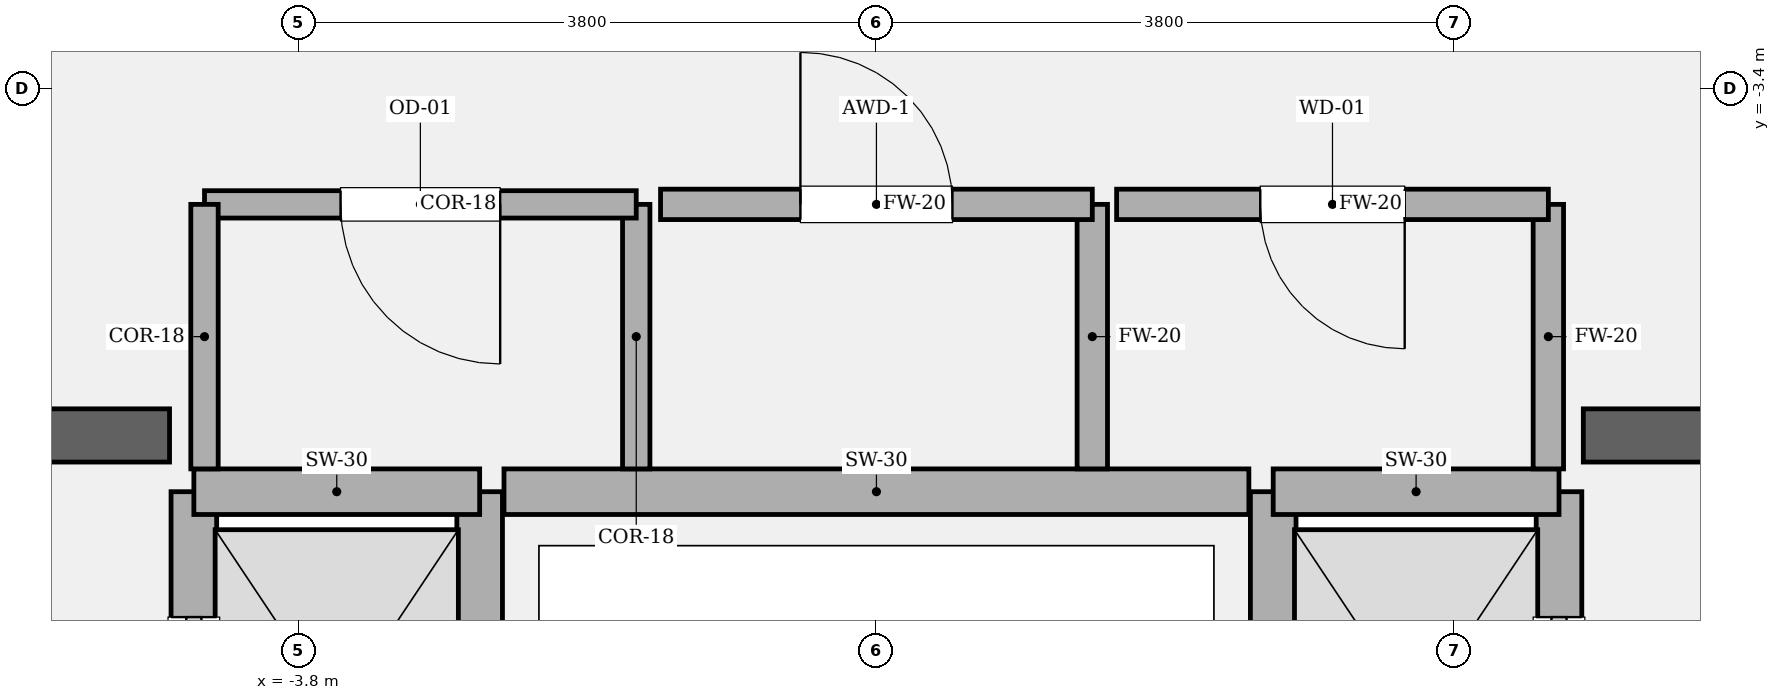
"""IFC4 building model, lengths in metres.
Left out: names, types, materials, properties, quantities, classifications, styles, units other than length and angle.
Written with IfcOpenShell. Run it as: python <this file> out.ifc"""

import sys

from ifc_helpers import new_model, si_unit, direction, frame, frame_2d, origin, place, context, subcontext, project, spatial, rectangle, extrude, element, fill, save


model = new_model("IFC4")
c1 = context("Model", 3, precision=1e-05, world=origin(), true_north=direction((0.0, 1.0)))
c2 = subcontext(c1, "Body", "Model", "MODEL_VIEW")
j1 = project(units=[si_unit("LENGTHUNIT", "METRE"), si_unit("PLANEANGLEUNIT", "RADIAN")], contexts=[c1])
p1 = place(None, origin())
s1 = spatial("IfcSite", under=j1, at=p1, CompositionType="ELEMENT")
p2 = place(p1, origin())
s2 = spatial("IfcBuilding", under=s1, at=p2, CompositionType="ELEMENT")
p3 = place(p2, frame((0.0, 0.0, 11.4)))
s3 = spatial("IfcBuildingStorey", under=s2, at=p3, CompositionType="ELEMENT", Elevation=11.4)
p4 = place(p3, frame((-9.825, -5.68, 0.0), z_axis=(0.0, 0.0, 1.0), x_axis=(1.0, 0.0, 0.0)))
e1 = element("IfcWall", 1, at=p4, inside=s3, PredefinedType="SOLIDWALL", context=c2, shape_type="SweptSolid", body=[
    extrude(rectangle(XDim=5.175, YDim=0.35, at=frame_2d((2.587, 0.0))), origin(), (0.0, 0.0, 1.0), 5.4),
])
p5 = place(p4, frame((1.285, 0.0, 0.0)))
e2 = element("IfcOpeningElement", 2, at=p5, cuts=e1, PredefinedType="OPENING", context=c2, shape_type="SweptSolid", body=[
    extrude(rectangle(XDim=1.18, YDim=2.2, at=frame_2d((0.59, 1.1))), frame((0.0, 0.185, 0.0), z_axis=(0.0, -1.0, 0.0), x_axis=(1.0, 0.0, 0.0)), (0.0, 0.0, 1.0), 0.37),
])
p6 = place(p3, frame((4.65, -5.68, 0.0), z_axis=(0.0, 0.0, 1.0), x_axis=(1.0, 0.0, 0.0)))
e3 = element("IfcWall", 3, at=p6, inside=s3, PredefinedType="SOLIDWALL", context=c2, shape_type="SweptSolid", body=[
    extrude(rectangle(XDim=5.175, YDim=0.35, at=frame_2d((2.587, 0.0))), origin(), (0.0, 0.0, 1.0), 5.4),
])
p7 = place(p6, frame((2.71, 0.0, 0.0)))
e4 = element("IfcOpeningElement", 4, at=p7, cuts=e3, PredefinedType="OPENING", context=c2, shape_type="SweptSolid", body=[
    extrude(rectangle(XDim=1.18, YDim=2.2, at=frame_2d((0.59, 1.1))), frame((0.0, 0.185, 0.0), z_axis=(0.0, -1.0, 0.0), x_axis=(1.0, 0.0, 0.0)), (0.0, 0.0, 1.0), 0.37),
])
p8 = place(p3, frame((-4.49, -8.82, 0.0), z_axis=(0.0, 0.0, 1.0), x_axis=(0.0, 1.0, 0.0)))
e5 = element("IfcWall", 5, at=p8, inside=s3, PredefinedType="SOLIDWALL", context=c2, shape_type="SweptSolid", body=[
    extrude(rectangle(XDim=2.77, YDim=0.3, at=frame_2d((1.385, 0.0))), origin(), (0.0, 0.0, 1.0), 5.12),
])
p9 = place(p8, frame((0.825, 0.0, 0.0)))
e6 = element("IfcOpeningElement", 6, at=p9, cuts=e5, PredefinedType="OPENING", context=c2, shape_type="SweptSolid", body=[
    extrude(rectangle(XDim=1.12, YDim=2.25, at=frame_2d((0.56, 1.125))), frame((0.0, 0.16, 0.0), z_axis=(0.0, -1.0, 0.0), x_axis=(1.0, 0.0, 0.0)), (0.0, 0.0, 1.0), 0.32),
])
p10 = place(p3, frame((-2.61, -8.82, 0.0), z_axis=(0.0, 0.0, 1.0), x_axis=(0.0, 1.0, 0.0)))
e7 = element("IfcWall", 7, at=p10, inside=s3, PredefinedType="SOLIDWALL", context=c2, shape_type="SweptSolid", body=[
    extrude(rectangle(XDim=2.77, YDim=0.3, at=frame_2d((1.385, 0.0))), origin(), (0.0, 0.0, 1.0), 5.12),
])
p11 = place(p3, frame((-4.49, -6.05, 0.0), z_axis=(0.0, 0.0, 1.0), x_axis=(1.0, 0.0, 0.0)))
e8 = element("IfcWall", 8, at=p11, inside=s3, PredefinedType="SOLIDWALL", context=c2, shape_type="SweptSolid", body=[
    extrude(rectangle(XDim=1.88, YDim=0.3, at=frame_2d((0.94, 0.0))), origin(), (0.0, 0.0, 1.0), 5.12),
])
p12 = place(p3, frame((4.49, -8.82, 0.0), z_axis=(0.0, 0.0, 1.0), x_axis=(0.0, 1.0, 0.0)))
e9 = element("IfcWall", 9, at=p12, inside=s3, PredefinedType="SOLIDWALL", context=c2, shape_type="SweptSolid", body=[
    extrude(rectangle(XDim=2.77, YDim=0.3, at=frame_2d((1.385, 0.0))), origin(), (0.0, 0.0, 1.0), 5.12),
])
p13 = place(p12, frame((0.825, 0.0, 0.0)))
e10 = element("IfcOpeningElement", 10, at=p13, cuts=e9, PredefinedType="OPENING", context=c2, shape_type="SweptSolid", body=[
    extrude(rectangle(XDim=1.12, YDim=2.25, at=frame_2d((0.56, 1.125))), frame((0.0, 0.16, 0.0), z_axis=(0.0, -1.0, 0.0), x_axis=(1.0, 0.0, 0.0)), (0.0, 0.0, 1.0), 0.32),
])
p14 = place(p3, frame((2.61, -8.82, 0.0), z_axis=(0.0, 0.0, 1.0), x_axis=(0.0, 1.0, 0.0)))
e11 = element("IfcWall", 11, at=p14, inside=s3, PredefinedType="SOLIDWALL", context=c2, shape_type="SweptSolid", body=[
    extrude(rectangle(XDim=2.77, YDim=0.3, at=frame_2d((1.385, 0.0))), origin(), (0.0, 0.0, 1.0), 5.12),
])
p15 = place(p3, frame((2.61, -6.05, 0.0), z_axis=(0.0, 0.0, 1.0), x_axis=(1.0, 0.0, 0.0)))
e12 = element("IfcWall", 12, at=p15, inside=s3, PredefinedType="SOLIDWALL", context=c2, shape_type="SweptSolid", body=[
    extrude(rectangle(XDim=1.88, YDim=0.3, at=frame_2d((0.94, 0.0))), origin(), (0.0, 0.0, 1.0), 5.12),
])
p16 = place(p3, frame((-2.45, -6.05, 0.0), z_axis=(0.0, 0.0, 1.0), x_axis=(1.0, 0.0, 0.0)))
e13 = element("IfcWall", 13, at=p16, inside=s3, PredefinedType="SOLIDWALL", context=c2, shape_type="SweptSolid", body=[
    extrude(rectangle(XDim=4.9, YDim=0.3, at=frame_2d((2.45, 0.0))), origin(), (0.0, 0.0, 1.0), 5.12),
])
p17 = place(p3, frame((-1.58, -5.9, 0.0), z_axis=(0.0, 0.0, 1.0), x_axis=(0.0, 1.0, 0.0)))
e14 = element("IfcWall", 14, at=p17, inside=s3, PredefinedType="PARTITIONING", context=c2, shape_type="SweptSolid", body=[
    extrude(rectangle(XDim=1.74, YDim=0.18, at=frame_2d((0.87, 0.0))), origin(), (0.0, 0.0, 1.0), 5.12),
])
p18 = place(p3, frame((-1.58, -4.16, 0.0), z_axis=(0.0, 0.0, 1.0), x_axis=(-1.0, 0.0, 0.0)))
e15 = element("IfcWall", 15, at=p18, inside=s3, PredefinedType="PARTITIONING", context=c2, shape_type="SweptSolid", body=[
    extrude(rectangle(XDim=2.84, YDim=0.18, at=frame_2d((1.42, 0.0))), origin(), (0.0, 0.0, 1.0), 5.12),
])
p19 = place(p18, frame((0.895, 0.0, 0.0)))
e16 = element("IfcOpeningElement", 16, at=p19, cuts=e15, PredefinedType="OPENING", context=c2, shape_type="SweptSolid", body=[
    extrude(rectangle(XDim=1.05, YDim=2.2, at=frame_2d((0.525, 1.1))), frame((0.0, 0.1, 0.0), z_axis=(0.0, -1.0, 0.0), x_axis=(1.0, 0.0, 0.0)), (0.0, 0.0, 1.0), 0.2),
])
p20 = place(p3, frame((-4.42, -4.16, 0.0), z_axis=(0.0, 0.0, 1.0), x_axis=(0.0, -1.0, 0.0)))
e17 = element("IfcWall", 17, at=p20, inside=s3, PredefinedType="PARTITIONING", context=c2, shape_type="SweptSolid", body=[
    extrude(rectangle(XDim=1.74, YDim=0.18, at=frame_2d((0.87, 0.0))), origin(), (0.0, 0.0, 1.0), 5.12),
])
p21 = place(p3, frame((1.42, -5.9, 0.0), z_axis=(0.0, 0.0, 1.0), x_axis=(0.0, 1.0, 0.0)))
e18 = element("IfcWall", 18, at=p21, inside=s3, PredefinedType="SOLIDWALL", context=c2, shape_type="SweptSolid", body=[
    extrude(rectangle(XDim=1.74, YDim=0.2, at=frame_2d((0.87, 0.0))), origin(), (0.0, 0.0, 1.0), 5.12),
])
p22 = place(p3, frame((1.42, -4.16, 0.0), z_axis=(0.0, 0.0, 1.0), x_axis=(-1.0, 0.0, 0.0)))
e19 = element("IfcWall", 19, at=p22, inside=s3, PredefinedType="SOLIDWALL", context=c2, shape_type="SweptSolid", body=[
    extrude(rectangle(XDim=2.84, YDim=0.2, at=frame_2d((1.42, 0.0))), origin(), (0.0, 0.0, 1.0), 5.12),
])
p23 = place(p22, frame((0.92, 0.0, 0.0)))
e20 = element("IfcOpeningElement", 20, at=p23, cuts=e19, PredefinedType="OPENING", context=c2, shape_type="SweptSolid", body=[
    extrude(rectangle(XDim=1.0, YDim=2.15, at=frame_2d((0.5, 1.075))), frame((0.0, 0.11, 0.0), z_axis=(0.0, -1.0, 0.0), x_axis=(1.0, 0.0, 0.0)), (0.0, 0.0, 1.0), 0.22),
])
p24 = place(p3, frame((4.42, -5.9, 0.0), z_axis=(0.0, 0.0, 1.0), x_axis=(0.0, 1.0, 0.0)))
e21 = element("IfcWall", 21, at=p24, inside=s3, PredefinedType="SOLIDWALL", context=c2, shape_type="SweptSolid", body=[
    extrude(rectangle(XDim=1.74, YDim=0.2, at=frame_2d((0.87, 0.0))), origin(), (0.0, 0.0, 1.0), 5.12),
])
p25 = place(p3, frame((4.42, -4.16, 0.0), z_axis=(0.0, 0.0, 1.0), x_axis=(-1.0, 0.0, 0.0)))
e22 = element("IfcWall", 22, at=p25, inside=s3, PredefinedType="SOLIDWALL", context=c2, shape_type="SweptSolid", body=[
    extrude(rectangle(XDim=2.84, YDim=0.2, at=frame_2d((1.42, 0.0))), origin(), (0.0, 0.0, 1.0), 5.12),
])
p26 = place(p25, frame((0.945, 0.0, 0.0)))
e23 = element("IfcOpeningElement", 23, at=p26, cuts=e22, PredefinedType="OPENING", context=c2, shape_type="SweptSolid", body=[
    extrude(rectangle(XDim=0.95, YDim=2.15, at=frame_2d((0.475, 1.075))), frame((0.0, 0.11, 0.0), z_axis=(0.0, -1.0, 0.0), x_axis=(1.0, 0.0, 0.0)), (0.0, 0.0, 1.0), 0.22),
])
p27 = place(p9, origin())
e24 = element("IfcDoor", 24, at=p27, inside=s3, OperationType="SLIDING_TO_LEFT", PredefinedType="DOOR", context=c2, shape_type="SweptSolid", body=[
    extrude(rectangle(XDim=1.12, YDim=2.25, at=frame_2d((0.56, 1.125))), frame((0.0, 0.025, 0.0), z_axis=(0.0, -1.0, 0.0), x_axis=(1.0, 0.0, 0.0)), (0.0, 0.0, 1.0), 0.05),
])
fill(e6, e24)
p28 = place(p13, origin())
e25 = element("IfcDoor", 25, at=p28, inside=s3, OperationType="SLIDING_TO_RIGHT", PredefinedType="DOOR", context=c2, shape_type="SweptSolid", body=[
    extrude(rectangle(XDim=1.12, YDim=2.25, at=frame_2d((0.56, 1.125))), frame((0.0, 0.025, 0.0), z_axis=(0.0, -1.0, 0.0), x_axis=(1.0, 0.0, 0.0)), (0.0, 0.0, 1.0), 0.05),
])
fill(e10, e25)
p29 = place(p19, origin())
e26 = element("IfcDoor", 26, at=p29, inside=s3, OperationType="SINGLE_SWING_LEFT", PredefinedType="DOOR", context=c2, shape_type="SweptSolid", body=[
    extrude(rectangle(XDim=1.05, YDim=2.2, at=frame_2d((0.525, 1.1))), frame((0.0, 0.025, 0.0), z_axis=(0.0, -1.0, 0.0), x_axis=(1.0, 0.0, 0.0)), (0.0, 0.0, 1.0), 0.05),
])
fill(e16, e26)
p30 = place(p23, origin())
e27 = element("IfcDoor", 27, at=p30, inside=s3, OperationType="SINGLE_SWING_RIGHT", PredefinedType="DOOR", context=c2, shape_type="SweptSolid", body=[
    extrude(rectangle(XDim=1.0, YDim=2.15, at=frame_2d((0.5, 1.075))), frame((0.0, 0.025, 0.0), z_axis=(0.0, -1.0, 0.0), x_axis=(1.0, 0.0, 0.0)), (0.0, 0.0, 1.0), 0.05),
])
fill(e20, e27)
p31 = place(p26, origin())
e28 = element("IfcDoor", 28, at=p31, inside=s3, OperationType="SINGLE_SWING_LEFT", PredefinedType="DOOR", context=c2, shape_type="SweptSolid", body=[
    extrude(rectangle(XDim=0.95, YDim=2.15, at=frame_2d((0.475, 1.075))), frame((0.0, 0.025, 0.0), z_axis=(0.0, -1.0, 0.0), x_axis=(1.0, 0.0, 0.0)), (0.0, 0.0, 1.0), 0.05),
])
fill(e23, e28)
save(model, sys.argv[1])
